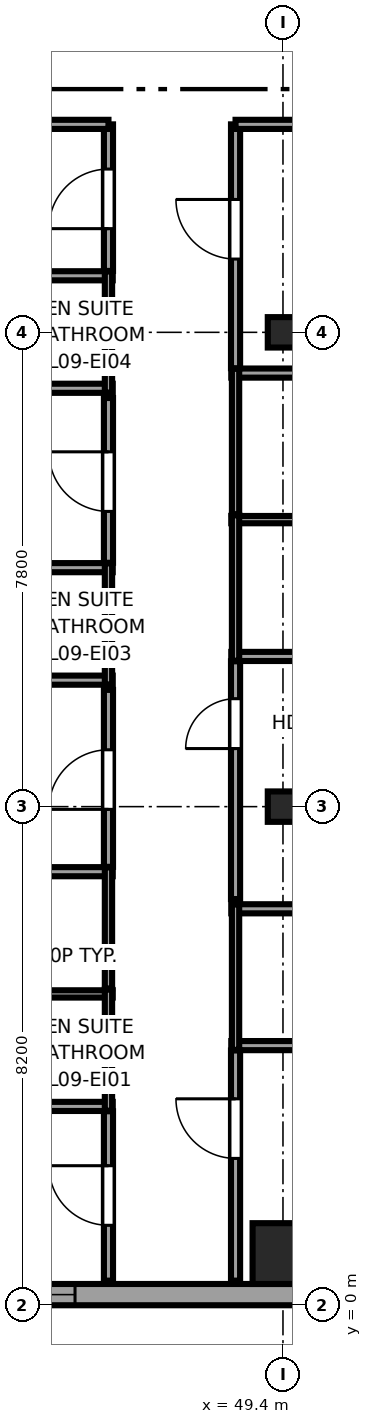
"""IFC4 building model, lengths in metres.
Left out: names, types, materials, properties, quantities, classifications, styles, units other than length and angle.
Written with IfcOpenShell. Run it as: python <this file> out.ifc"""

import sys

from ifc_helpers import new_model, si_unit, direction, frame, frame_2d, origin, origin_2d, place, context, subcontext, project, spatial, rectangle, i_section, extrude, source, transform, mapped, element, fill, save


model = new_model("IFC4")
c1 = context("Model", 3, precision=1e-05, world=origin(), true_north=direction((0.0, 1.0)))
c2 = subcontext(c1, "Body", "Model", "MODEL_VIEW")
j1 = project(units=[si_unit("LENGTHUNIT", "METRE"), si_unit("PLANEANGLEUNIT", "RADIAN")], contexts=[c1])
p1 = place(None, origin())
s1 = spatial("IfcSite", under=j1, at=p1, CompositionType="ELEMENT")
p2 = place(p1, origin())
s2 = spatial("IfcBuilding", under=s1, at=p2, CompositionType="ELEMENT")
p3 = place(p2, frame((0.0, 0.0, 42.65)))
s3 = spatial("IfcBuildingStorey", under=s2, at=p3, CompositionType="ELEMENT", Elevation=42.65)
m1 = source(origin(), c2, "Body", "SweptSolid", [
    extrude(rectangle(XDim=1.0, YDim=1.0, at=origin_2d()), origin(), (0.0, 0.0, 1.0), 3.55),
])
p4 = place(p3, frame((49.4, 0.85, 0.0), z_axis=(0.0, 0.0, 1.0), x_axis=(1.0, 0.0, 0.0)))
e1 = element("IfcColumn", 1, at=p4, inside=s3, PredefinedType="COLUMN", context=c2, shape_type="MappedRepresentation", body=[
    mapped(m1, transform((0.0, 0.0, 0.0), x_axis=(1.0, 0.0, 0.0), y_axis=(0.0, 1.0, 0.0), z_axis=(0.0, 0.0, 1.0), scale=1.0)),
])
m2 = source(origin(), c2, "Body", "SweptSolid", [
    extrude(i_section(OverallWidth=0.5, OverallDepth=0.5, WebThickness=0.028, FlangeThickness=0.045, at=origin_2d()), origin(), (0.0, 0.0, 1.0), 3.55),
])
for number, where, z_axis, x_axis in (
    (2, (49.4, 8.2, 0.0), (0.0, 0.0, 1.0), (1.0, 0.0, 0.0)),
    (3, (49.4, 16.0, 0.0), (0.0, 0.0, 1.0), (1.0, 0.0, 0.0)),
):
    element("IfcColumn", number, at=place(p3, frame(where, z_axis=z_axis, x_axis=x_axis)), inside=s3, PredefinedType="COLUMN", context=c2, shape_type="MappedRepresentation", body=[
        mapped(m2, transform((0.0, 0.0, 0.0), x_axis=(1.0, 0.0, 0.0), y_axis=(0.0, 1.0, 0.0), z_axis=(0.0, 0.0, 1.0), scale=1.0)),
    ])
p5 = place(p3, frame((34.375, 0.175, 0.0), z_axis=(0.0, 0.0, 1.0), x_axis=(1.0, 0.0, 0.0)))
e4 = element("IfcWall", 4, at=p5, inside=s3, PredefinedType="SOLIDWALL", context=c2, shape_type="SweptSolid", body=[
    extrude(rectangle(XDim=18.008, YDim=0.35, at=frame_2d((9.004, 0.0))), origin(), (0.0, 0.0, 1.0), 3.37),
])
p6 = place(p5, frame((1.651, 0.0, 0.68)))
e5 = element("IfcOpeningElement", 5, at=p6, cuts=e4, PredefinedType="OPENING", context=c2, shape_type="SweptSolid", body=[
    extrude(rectangle(XDim=2.1, YDim=1.9, at=frame_2d((1.05, 0.95))), frame((0.0, 0.185, 0.0), z_axis=(0.0, -1.0, 0.0), x_axis=(1.0, 0.0, 0.0)), (0.0, 0.0, 1.0), 0.37),
])
p7 = place(p5, frame((9.505, 0.0, 0.68)))
e6 = element("IfcOpeningElement", 6, at=p7, cuts=e4, PredefinedType="OPENING", context=c2, shape_type="SweptSolid", body=[
    extrude(rectangle(XDim=2.1, YDim=1.9, at=frame_2d((1.05, 0.95))), frame((0.0, 0.185, 0.0), z_axis=(0.0, -1.0, 0.0), x_axis=(1.0, 0.0, 0.0)), (0.0, 0.0, 1.0), 0.37),
])
p8 = place(p5, frame((15.725, 0.0, 0.62)))
e7 = element("IfcOpeningElement", 7, at=p8, cuts=e4, PredefinedType="OPENING", context=c2, shape_type="SweptSolid", body=[
    extrude(rectangle(XDim=1.5, YDim=1.55, at=frame_2d((0.75, 0.775))), frame((0.0, 0.185, 0.0), z_axis=(0.0, -1.0, 0.0), x_axis=(1.0, 0.0, 0.0)), (0.0, 0.0, 1.0), 0.37),
])
p9 = place(p3, frame((44.01, 3.27, 0.0), z_axis=(0.0, 0.0, 1.0), x_axis=(1.0, 0.0, 0.0)))
e8 = element("IfcWall", 8, at=p9, inside=s3, PredefinedType="PARTITIONING", context=c2, shape_type="SweptSolid", body=[
    extrude(rectangle(XDim=2.59, YDim=0.15, at=frame_2d((1.295, 0.0))), origin(), (0.0, 0.0, 1.0), 3.37),
])
p10 = place(p3, frame((44.01, 5.12, 0.0), z_axis=(0.0, 0.0, 1.0), x_axis=(1.0, 0.0, 0.0)))
e9 = element("IfcWall", 9, at=p10, inside=s3, PredefinedType="PLUMBINGWALL", context=c2, shape_type="SweptSolid", body=[
    extrude(rectangle(XDim=2.59, YDim=0.12, at=frame_2d((1.295, 0.0))), origin(), (0.0, 0.0, 1.0), 3.37),
])
p11 = place(p3, frame((46.53, 3.2, 0.0), z_axis=(0.0, 0.0, 1.0), x_axis=(0.0, 1.0, 0.0)))
e10 = element("IfcWall", 10, at=p11, inside=s3, PredefinedType="PLUMBINGWALL", context=c2, shape_type="SweptSolid", body=[
    extrude(rectangle(XDim=1.99, YDim=0.12, at=frame_2d((0.995, 0.0))), origin(), (0.0, 0.0, 1.0), 3.37),
])
p12 = place(p3, frame((44.01, 7.13, 0.0), z_axis=(0.0, 0.0, 1.0), x_axis=(1.0, 0.0, 0.0)))
e11 = element("IfcWall", 11, at=p12, inside=s3, PredefinedType="PARTITIONING", context=c2, shape_type="SweptSolid", body=[
    extrude(rectangle(XDim=2.59, YDim=0.15, at=frame_2d((1.295, 0.0))), origin(), (0.0, 0.0, 1.0), 3.37),
])
p13 = place(p3, frame((46.53, 5.21, 0.0), z_axis=(0.0, 0.0, 1.0), x_axis=(0.0, 1.0, 0.0)))
e12 = element("IfcWall", 12, at=p13, inside=s3, PredefinedType="PLUMBINGWALL", context=c2, shape_type="SweptSolid", body=[
    extrude(rectangle(XDim=1.99, YDim=0.12, at=frame_2d((0.995, 0.0))), origin(), (0.0, 0.0, 1.0), 3.37),
])
p14 = place(p3, frame((34.65, 10.28, 0.0), z_axis=(0.0, 0.0, 1.0), x_axis=(1.0, 0.0, 0.0)))
e13 = element("IfcWall", 13, at=p14, inside=s3, PredefinedType="PARTITIONING", context=c2, shape_type="SweptSolid", body=[
    extrude(rectangle(XDim=11.95, YDim=0.15, at=frame_2d((5.975, 0.0))), origin(), (0.0, 0.0, 1.0), 3.37),
])
p15 = place(p3, frame((44.01, 12.13, 0.0), z_axis=(0.0, 0.0, 1.0), x_axis=(1.0, 0.0, 0.0)))
e14 = element("IfcWall", 14, at=p15, inside=s3, PredefinedType="PARTITIONING", context=c2, shape_type="SweptSolid", body=[
    extrude(rectangle(XDim=2.59, YDim=0.15, at=frame_2d((1.295, 0.0))), origin(), (0.0, 0.0, 1.0), 3.37),
])
p16 = place(p3, frame((46.53, 10.21, 0.0), z_axis=(0.0, 0.0, 1.0), x_axis=(0.0, 1.0, 0.0)))
e15 = element("IfcWall", 15, at=p16, inside=s3, PredefinedType="PLUMBINGWALL", context=c2, shape_type="SweptSolid", body=[
    extrude(rectangle(XDim=1.99, YDim=0.12, at=frame_2d((0.995, 0.0))), origin(), (0.0, 0.0, 1.0), 3.37),
])
p17 = place(p3, frame((34.65, 15.08, 0.0), z_axis=(0.0, 0.0, 1.0), x_axis=(1.0, 0.0, 0.0)))
e16 = element("IfcWall", 16, at=p17, inside=s3, PredefinedType="PARTITIONING", context=c2, shape_type="SweptSolid", body=[
    extrude(rectangle(XDim=11.95, YDim=0.15, at=frame_2d((5.975, 0.0))), origin(), (0.0, 0.0, 1.0), 3.37),
])
p18 = place(p3, frame((44.01, 16.93, 0.0), z_axis=(0.0, 0.0, 1.0), x_axis=(1.0, 0.0, 0.0)))
e17 = element("IfcWall", 17, at=p18, inside=s3, PredefinedType="PARTITIONING", context=c2, shape_type="SweptSolid", body=[
    extrude(rectangle(XDim=2.59, YDim=0.15, at=frame_2d((1.295, 0.0))), origin(), (0.0, 0.0, 1.0), 3.37),
])
p19 = place(p3, frame((46.53, 15.01, 0.0), z_axis=(0.0, 0.0, 1.0), x_axis=(0.0, 1.0, 0.0)))
e18 = element("IfcWall", 18, at=p19, inside=s3, PredefinedType="PLUMBINGWALL", context=c2, shape_type="SweptSolid", body=[
    extrude(rectangle(XDim=1.99, YDim=0.12, at=frame_2d((0.995, 0.0))), origin(), (0.0, 0.0, 1.0), 3.37),
])
for number, where, z_axis, x_axis in (
    (19, (48.55, 4.27, 0.0), (0.0, 0.0, 1.0), (1.0, 0.0, 0.0)),
    (20, (48.55, 6.52, 0.0), (0.0, 0.0, 1.0), (1.0, 0.0, 0.0)),
):
    element("IfcWall", number, at=place(p3, frame(where, z_axis=z_axis, x_axis=x_axis)), inside=s3, PredefinedType="PARTITIONING", context=c2, shape_type="SweptSolid", body=[
        extrude(rectangle(XDim=2.59, YDim=0.15, at=frame_2d((1.295, 0.0))), origin(), (0.0, 0.0, 1.0), 3.37),
    ])
p20 = place(p3, frame((48.62, 4.2, 0.0), z_axis=(0.0, 0.0, 1.0), x_axis=(0.0, 1.0, 0.0)))
e21 = element("IfcWall", 21, at=p20, inside=s3, PredefinedType="PLUMBINGWALL", context=c2, shape_type="SweptSolid", body=[
    extrude(rectangle(XDim=2.39, YDim=0.12, at=frame_2d((1.195, 0.0))), origin(), (0.0, 0.0, 1.0), 3.37),
])
p21 = place(p3, frame((48.55, 10.67, 0.0), z_axis=(0.0, 0.0, 1.0), x_axis=(1.0, 0.0, 0.0)))
e22 = element("IfcWall", 22, at=p21, inside=s3, PredefinedType="PARTITIONING", context=c2, shape_type="SweptSolid", body=[
    extrude(rectangle(XDim=2.59, YDim=0.15, at=frame_2d((1.295, 0.0))), origin(), (0.0, 0.0, 1.0), 3.37),
])
p22 = place(p3, frame((48.55, 12.92, 0.0), z_axis=(0.0, 0.0, 1.0), x_axis=(1.0, 0.0, 0.0)))
e23 = element("IfcWall", 23, at=p22, inside=s3, PredefinedType="PLUMBINGWALL", context=c2, shape_type="SweptSolid", body=[
    extrude(rectangle(XDim=2.59, YDim=0.12, at=frame_2d((1.295, 0.0))), origin(), (0.0, 0.0, 1.0), 3.37),
])
p23 = place(p3, frame((48.62, 10.6, 0.0), z_axis=(0.0, 0.0, 1.0), x_axis=(0.0, 1.0, 0.0)))
e24 = element("IfcWall", 24, at=p23, inside=s3, PredefinedType="PLUMBINGWALL", context=c2, shape_type="SweptSolid", body=[
    extrude(rectangle(XDim=2.39, YDim=0.12, at=frame_2d((1.195, 0.0))), origin(), (0.0, 0.0, 1.0), 3.37),
])
p24 = place(p3, frame((48.55, 15.33, 0.0), z_axis=(0.0, 0.0, 1.0), x_axis=(1.0, 0.0, 0.0)))
e25 = element("IfcWall", 25, at=p24, inside=s3, PredefinedType="PARTITIONING", context=c2, shape_type="SweptSolid", body=[
    extrude(rectangle(XDim=2.59, YDim=0.15, at=frame_2d((1.295, 0.0))), origin(), (0.0, 0.0, 1.0), 3.37),
])
p25 = place(p3, frame((48.62, 13.01, 0.0), z_axis=(0.0, 0.0, 1.0), x_axis=(0.0, 1.0, 0.0)))
e26 = element("IfcWall", 26, at=p25, inside=s3, PredefinedType="PLUMBINGWALL", context=c2, shape_type="SweptSolid", body=[
    extrude(rectangle(XDim=2.39, YDim=0.12, at=frame_2d((1.195, 0.0))), origin(), (0.0, 0.0, 1.0), 3.37),
])
p26 = place(p3, frame((46.53, 0.405, 0.0), z_axis=(0.0, 0.0, 1.0), x_axis=(0.0, 1.0, 0.0)))
e27 = element("IfcWall", 27, at=p26, inside=s3, PredefinedType="PARTITIONING", context=c2, shape_type="SweptSolid", body=[
    extrude(rectangle(XDim=2.785, YDim=0.15, at=frame_2d((1.393, 0.0))), origin(), (0.0, 0.0, 1.0), 3.37),
])
p27 = place(p26, frame((0.91, 0.0, 0.0)))
e28 = element("IfcOpeningElement", 28, at=p27, cuts=e27, PredefinedType="OPENING", context=c2, shape_type="SweptSolid", body=[
    extrude(rectangle(XDim=0.98, YDim=2.12, at=frame_2d((0.49, 1.06))), frame((0.0, 0.085, 0.0), z_axis=(0.0, -1.0, 0.0), x_axis=(1.0, 0.0, 0.0)), (0.0, 0.0, 1.0), 0.17),
])
p28 = place(p3, frame((46.53, 7.21, 0.0), z_axis=(0.0, 0.0, 1.0), x_axis=(0.0, 1.0, 0.0)))
e29 = element("IfcWall", 29, at=p28, inside=s3, PredefinedType="PARTITIONING", context=c2, shape_type="SweptSolid", body=[
    extrude(rectangle(XDim=2.91, YDim=0.15, at=frame_2d((1.455, 0.0))), origin(), (0.0, 0.0, 1.0), 3.37),
])
p29 = place(p28, frame((0.945, 0.0, 0.0)))
e30 = element("IfcOpeningElement", 30, at=p29, cuts=e29, PredefinedType="OPENING", context=c2, shape_type="SweptSolid", body=[
    extrude(rectangle(XDim=0.98, YDim=2.12, at=frame_2d((0.49, 1.06))), frame((0.0, 0.085, 0.0), z_axis=(0.0, -1.0, 0.0), x_axis=(1.0, 0.0, 0.0)), (0.0, 0.0, 1.0), 0.17),
])
p30 = place(p3, frame((46.53, 12.21, 0.0), z_axis=(0.0, 0.0, 1.0), x_axis=(0.0, 1.0, 0.0)))
e31 = element("IfcWall", 31, at=p30, inside=s3, PredefinedType="PARTITIONING", context=c2, shape_type="SweptSolid", body=[
    extrude(rectangle(XDim=2.71, YDim=0.15, at=frame_2d((1.355, 0.0))), origin(), (0.0, 0.0, 1.0), 3.37),
])
p31 = place(p30, frame((0.845, 0.0, 0.0)))
e32 = element("IfcOpeningElement", 32, at=p31, cuts=e31, PredefinedType="OPENING", context=c2, shape_type="SweptSolid", body=[
    extrude(rectangle(XDim=0.98, YDim=2.12, at=frame_2d((0.49, 1.06))), frame((0.0, 0.085, 0.0), z_axis=(0.0, -1.0, 0.0), x_axis=(1.0, 0.0, 0.0)), (0.0, 0.0, 1.0), 0.17),
])
p32 = place(p3, frame((46.53, 17.01, 0.0), z_axis=(0.0, 0.0, 1.0), x_axis=(0.0, 1.0, 0.0)))
e33 = element("IfcWall", 33, at=p32, inside=s3, PredefinedType="PARTITIONING", context=c2, shape_type="SweptSolid", body=[
    extrude(rectangle(XDim=2.41, YDim=0.15, at=frame_2d((1.205, 0.0))), origin(), (0.0, 0.0, 1.0), 3.37),
])
p33 = place(p32, frame((0.695, 0.0, 0.0)))
e34 = element("IfcOpeningElement", 34, at=p33, cuts=e33, PredefinedType="OPENING", context=c2, shape_type="SweptSolid", body=[
    extrude(rectangle(XDim=0.98, YDim=2.12, at=frame_2d((0.49, 1.06))), frame((0.0, 0.085, 0.0), z_axis=(0.0, -1.0, 0.0), x_axis=(1.0, 0.0, 0.0)), (0.0, 0.0, 1.0), 0.17),
])
p34 = place(p3, frame((34.65, 19.42, 0.0), z_axis=(0.0, 0.0, 1.0), x_axis=(1.0, 0.0, 0.0)))
e35 = element("IfcWall", 35, at=p34, inside=s3, PredefinedType="PARTITIONING", context=c2, shape_type="SweptSolid", body=[
    extrude(rectangle(XDim=11.88, YDim=0.15, at=frame_2d((5.94, 0.0))), origin(), (0.0, 0.0, 1.0), 3.37),
])
p35 = place(p3, frame((48.62, 0.405, 0.0), z_axis=(0.0, 0.0, 1.0), x_axis=(0.0, 1.0, 0.0)))
e36 = element("IfcWall", 36, at=p35, inside=s3, PredefinedType="PARTITIONING", context=c2, shape_type="SweptSolid", body=[
    extrude(rectangle(XDim=3.785, YDim=0.15, at=frame_2d((1.893, 0.0))), origin(), (0.0, 0.0, 1.0), 3.37),
])
p36 = place(p35, frame((2.01, 0.0, 0.0)))
e37 = element("IfcOpeningElement", 37, at=p36, cuts=e36, PredefinedType="OPENING", context=c2, shape_type="SweptSolid", body=[
    extrude(rectangle(XDim=0.98, YDim=2.12, at=frame_2d((0.49, 1.06))), frame((0.0, 0.085, 0.0), z_axis=(0.0, -1.0, 0.0), x_axis=(1.0, 0.0, 0.0)), (0.0, 0.0, 1.0), 0.17),
])
p37 = place(p3, frame((48.62, 6.68, 0.0), z_axis=(0.0, 0.0, 1.0), x_axis=(0.0, 1.0, 0.0)))
e38 = element("IfcWall", 38, at=p37, inside=s3, PredefinedType="PARTITIONING", context=c2, shape_type="SweptSolid", body=[
    extrude(rectangle(XDim=3.91, YDim=0.15, at=frame_2d((1.955, 0.0))), origin(), (0.0, 0.0, 1.0), 3.37),
])
p38 = place(p37, frame((2.475, 0.0, 0.0)))
e39 = element("IfcOpeningElement", 39, at=p38, cuts=e38, PredefinedType="OPENING", context=c2, shape_type="SweptSolid", body=[
    extrude(rectangle(XDim=0.82, YDim=2.01, at=frame_2d((0.41, 1.005))), frame((0.0, 0.085, 0.0), z_axis=(0.0, -1.0, 0.0), x_axis=(1.0, 0.0, 0.0)), (0.0, 0.0, 1.0), 0.17),
])
p39 = place(p3, frame((48.62, 15.41, 0.0), z_axis=(0.0, 0.0, 1.0), x_axis=(0.0, 1.0, 0.0)))
e40 = element("IfcWall", 40, at=p39, inside=s3, PredefinedType="PARTITIONING", context=c2, shape_type="SweptSolid", body=[
    extrude(rectangle(XDim=4.01, YDim=0.15, at=frame_2d((2.005, 0.0))), origin(), (0.0, 0.0, 1.0), 3.37),
])
p40 = place(p39, frame((1.795, 0.0, 0.0)))
e41 = element("IfcOpeningElement", 41, at=p40, cuts=e40, PredefinedType="OPENING", context=c2, shape_type="SweptSolid", body=[
    extrude(rectangle(XDim=0.98, YDim=2.12, at=frame_2d((0.49, 1.06))), frame((0.0, 0.085, 0.0), z_axis=(0.0, -1.0, 0.0), x_axis=(1.0, 0.0, 0.0)), (0.0, 0.0, 1.0), 0.17),
])
p41 = place(p3, frame((48.62, 19.42, 0.0), z_axis=(0.0, 0.0, 1.0), x_axis=(1.0, 0.0, 0.0)))
e42 = element("IfcWall", 42, at=p41, inside=s3, PredefinedType="PARTITIONING", context=c2, shape_type="SweptSolid", body=[
    extrude(rectangle(XDim=7.975, YDim=0.15, at=frame_2d((3.987, 0.0))), origin(), (0.0, 0.0, 1.0), 3.37),
])
m3 = source(origin(), c2, "Body", "SweptSolid", [
    extrude(rectangle(XDim=2.1, YDim=1.9, at=frame_2d((1.05, 0.95))), frame((0.0, 0.09, 0.0), z_axis=(0.0, -1.0, 0.0), x_axis=(1.0, 0.0, 0.0)), (0.0, 0.0, 1.0), 0.06),
])
p42 = place(p7, origin())
e43 = element("IfcWindow", 43, at=p42, inside=s3, PartitioningType="TRIPLE_PANEL_HORIZONTAL", PredefinedType="WINDOW", context=c2, shape_type="MappedRepresentation", body=[
    mapped(m3, transform((0.0, 0.0, 0.0), x_axis=(1.0, 0.0, 0.0), y_axis=(0.0, 1.0, 0.0), z_axis=(0.0, 0.0, 1.0), scale=1.0)),
])
fill(e6, e43)
m4 = source(origin(), c2, "Body", "SweptSolid", [
    extrude(rectangle(XDim=0.98, YDim=2.12, at=frame_2d((0.49, 1.06))), frame((0.0, 0.025, 0.0), z_axis=(0.0, -1.0, 0.0), x_axis=(1.0, 0.0, 0.0)), (0.0, 0.0, 1.0), 0.05),
])
p43 = place(p27, origin())
e44 = element("IfcDoor", 44, at=p43, inside=s3, OperationType="SINGLE_SWING_RIGHT", PredefinedType="DOOR", context=c2, shape_type="MappedRepresentation", body=[
    mapped(m4, transform((0.0, 0.0, 0.0), x_axis=(1.0, 0.0, 0.0), y_axis=(0.0, 1.0, 0.0), z_axis=(0.0, 0.0, 1.0), scale=1.0)),
])
fill(e28, e44)
p44 = place(p29, origin())
e45 = element("IfcDoor", 45, at=p44, inside=s3, OperationType="SINGLE_SWING_LEFT", PredefinedType="DOOR", context=c2, shape_type="MappedRepresentation", body=[
    mapped(m4, transform((0.0, 0.0, 0.0), x_axis=(1.0, 0.0, 0.0), y_axis=(0.0, 1.0, 0.0), z_axis=(0.0, 0.0, 1.0), scale=1.0)),
])
fill(e30, e45)
p45 = place(p31, origin())
e46 = element("IfcDoor", 46, at=p45, inside=s3, OperationType="SINGLE_SWING_RIGHT", PredefinedType="DOOR", context=c2, shape_type="MappedRepresentation", body=[
    mapped(m4, transform((0.0, 0.0, 0.0), x_axis=(1.0, 0.0, 0.0), y_axis=(0.0, 1.0, 0.0), z_axis=(0.0, 0.0, 1.0), scale=1.0)),
])
fill(e32, e46)
p46 = place(p33, origin())
e47 = element("IfcDoor", 47, at=p46, inside=s3, OperationType="SINGLE_SWING_LEFT", PredefinedType="DOOR", context=c2, shape_type="MappedRepresentation", body=[
    mapped(m4, transform((0.0, 0.0, 0.0), x_axis=(1.0, 0.0, 0.0), y_axis=(0.0, 1.0, 0.0), z_axis=(0.0, 0.0, 1.0), scale=1.0)),
])
fill(e34, e47)
p47 = place(p36, origin())
e48 = element("IfcDoor", 48, at=p47, inside=s3, OperationType="SINGLE_SWING_RIGHT", PredefinedType="DOOR", context=c2, shape_type="MappedRepresentation", body=[
    mapped(m4, transform((0.0, 0.0, 0.0), x_axis=(1.0, 0.0, 0.0), y_axis=(0.0, 1.0, 0.0), z_axis=(0.0, 0.0, 1.0), scale=1.0)),
])
fill(e37, e48)
m5 = source(origin(), c2, "Body", "SweptSolid", [
    extrude(rectangle(XDim=0.82, YDim=2.01, at=frame_2d((0.41, 1.005))), frame((0.0, 0.025, 0.0), z_axis=(0.0, -1.0, 0.0), x_axis=(1.0, 0.0, 0.0)), (0.0, 0.0, 1.0), 0.05),
])
p48 = place(p38, origin())
e49 = element("IfcDoor", 49, at=p48, inside=s3, OperationType="SINGLE_SWING_LEFT", PredefinedType="DOOR", context=c2, shape_type="MappedRepresentation", body=[
    mapped(m5, transform((0.0, 0.0, 0.0), x_axis=(1.0, 0.0, 0.0), y_axis=(0.0, 1.0, 0.0), z_axis=(0.0, 0.0, 1.0), scale=1.0)),
])
fill(e39, e49)
p49 = place(p40, origin())
e50 = element("IfcDoor", 50, at=p49, inside=s3, OperationType="SINGLE_SWING_RIGHT", PredefinedType="DOOR", context=c2, shape_type="MappedRepresentation", body=[
    mapped(m4, transform((0.0, 0.0, 0.0), x_axis=(1.0, 0.0, 0.0), y_axis=(0.0, 1.0, 0.0), z_axis=(0.0, 0.0, 1.0), scale=1.0)),
])
fill(e41, e50)
save(model, sys.argv[1])
